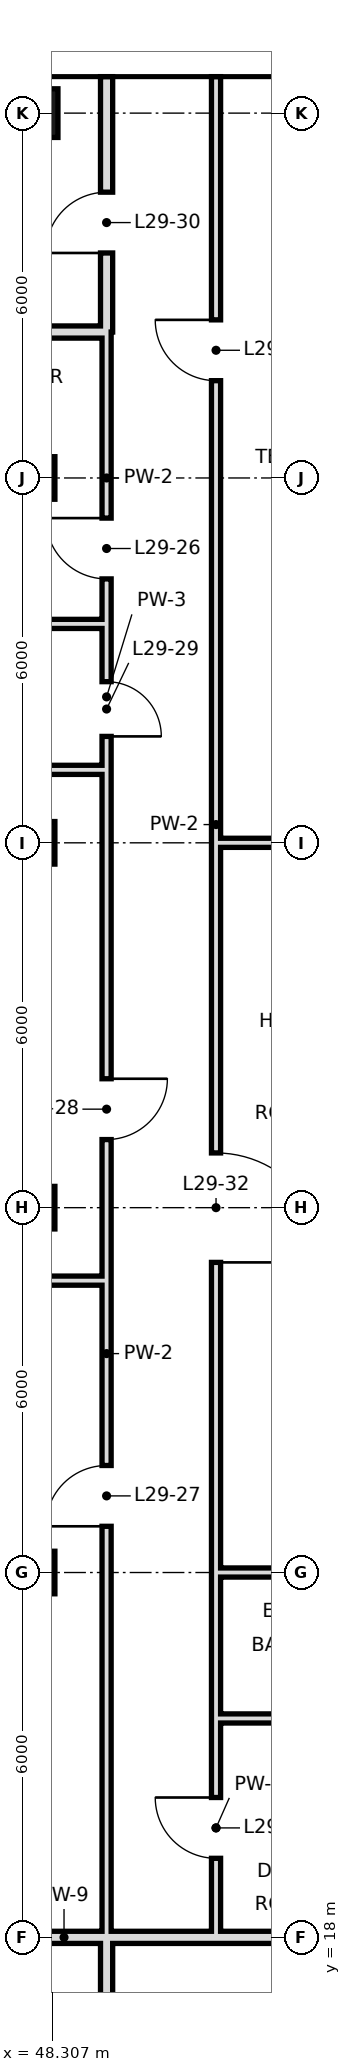
"""IFC4 building model, lengths in metres.
Left out: names, types, materials, properties, quantities, classifications, styles, units other than length and angle.
Written with IfcOpenShell. Run it as: python <this file> out.ifc"""

import sys

from ifc_helpers import new_model, si_unit, direction, frame, frame_2d, origin, origin_2d, place, context, subcontext, project, spatial, rectangle, hollow_rectangle, extrude, element, fill, save


model = new_model("IFC4")
c1 = context("Model", 3, precision=1e-05, world=origin(), true_north=direction((0.0, 1.0)))
c2 = subcontext(c1, "Body", "Model", "MODEL_VIEW")
j1 = project(units=[si_unit("LENGTHUNIT", "METRE"), si_unit("PLANEANGLEUNIT", "RADIAN")], contexts=[c1])
p1 = place(None, origin())
s1 = spatial("IfcSite", under=j1, at=p1, CompositionType="ELEMENT")
p2 = place(p1, origin())
s2 = spatial("IfcBuilding", under=s1, at=p2, CompositionType="ELEMENT")
p3 = place(p2, frame((0.0, 0.0, 130.4)))
s3 = spatial("IfcBuildingStorey", under=s2, at=p3, CompositionType="ELEMENT", Elevation=130.4)
for number, where, z_axis, x_axis in (
    (1, (48.0, 24.0, 0.0), (0.0, 0.0, 1.0), (1.0, 0.0, 0.0)),
    (2, (48.0, 30.0, 0.0), (0.0, 0.0, 1.0), (1.0, 0.0, 0.0)),
    (3, (48.0, 36.0, 0.0), (0.0, 0.0, 1.0), (1.0, 0.0, 0.0)),
    (4, (48.0, 42.0, 0.0), (0.0, 0.0, 1.0), (1.0, 0.0, 0.0)),
):
    element("IfcColumn", number, at=place(p3, frame(where, z_axis=z_axis, x_axis=x_axis)), inside=s3, PredefinedType="COLUMN", context=c2, shape_type="SweptSolid", body=[
        extrude(hollow_rectangle(XDim=0.7, YDim=0.7, WallThickness=0.036, at=origin_2d()), origin(), (0.0, 0.0, 1.0), 3.6),
    ])
p4 = place(p3, frame((48.0, 48.0, 0.0), z_axis=(0.0, 0.0, 1.0), x_axis=(1.0, 0.0, 0.0)))
e5 = element("IfcColumn", 5, at=p4, inside=s3, PredefinedType="COLUMN", context=c2, shape_type="SweptSolid", body=[
    extrude(hollow_rectangle(XDim=0.8, YDim=0.8, WallThickness=0.04, at=origin_2d()), origin(), (0.0, 0.0, 1.0), 3.6),
])
p5 = place(p3, frame((49.2, 10.8, 0.0), z_axis=(0.0, 0.0, 1.0), x_axis=(0.0, 1.0, 0.0)))
e6 = element("IfcWall", 6, at=p5, inside=s3, PredefinedType="SOLIDWALL", context=c2, shape_type="SweptSolid", body=[
    extrude(rectangle(XDim=7.2, YDim=0.2, at=frame_2d((3.6, 0.0))), origin(), (0.0, 0.0, 1.0), 2.72),
])
p6 = place(p3, frame((49.2, 44.4, 0.0), z_axis=(0.0, 0.0, 1.0), x_axis=(0.0, 1.0, 0.0)))
e7 = element("IfcWall", 7, at=p6, inside=s3, PredefinedType="SOLIDWALL", context=c2, shape_type="SweptSolid", body=[
    extrude(rectangle(XDim=4.2, YDim=0.2, at=frame_2d((2.1, 0.0))), origin(), (0.0, 0.0, 1.0), 2.97),
])
p7 = place(p6, frame((1.3, 0.0, 0.0)))
e8 = element("IfcOpeningElement", 8, at=p7, cuts=e7, PredefinedType="OPENING", context=c2, shape_type="SweptSolid", body=[
    extrude(rectangle(XDim=1.0, YDim=2.4, at=frame_2d((0.5, 1.2))), frame((0.0, 0.11, 0.0), z_axis=(0.0, -1.0, 0.0), x_axis=(1.0, 0.0, 0.0)), (0.0, 0.0, 1.0), 0.22),
])
p8 = place(p3, frame((49.2, 18.0, 0.0), z_axis=(0.0, 0.0, 1.0), x_axis=(0.0, 1.0, 0.0)))
e9 = element("IfcWall", 9, at=p8, inside=s3, PredefinedType="PARTITIONING", context=c2, shape_type="SweptSolid", body=[
    extrude(rectangle(XDim=19.2, YDim=0.15, at=frame_2d((9.6, 0.0))), origin(), (0.0, 0.0, 1.0), 3.42),
])
p9 = place(p8, frame((6.76, 0.0, 0.0)))
e10 = element("IfcOpeningElement", 10, at=p9, cuts=e9, PredefinedType="OPENING", context=c2, shape_type="SweptSolid", body=[
    extrude(rectangle(XDim=1.0, YDim=2.4, at=frame_2d((0.5, 1.2))), frame((0.0, 0.085, 0.0), z_axis=(0.0, -1.0, 0.0), x_axis=(1.0, 0.0, 0.0)), (0.0, 0.0, 1.0), 0.17),
])
p10 = place(p8, frame((13.12, 0.0, 0.0)))
e11 = element("IfcOpeningElement", 11, at=p10, cuts=e9, PredefinedType="OPENING", context=c2, shape_type="SweptSolid", body=[
    extrude(rectangle(XDim=1.0, YDim=2.4, at=frame_2d((0.5, 1.2))), frame((0.0, 0.085, 0.0), z_axis=(0.0, -1.0, 0.0), x_axis=(1.0, 0.0, 0.0)), (0.0, 0.0, 1.0), 0.17),
])
p11 = place(p3, frame((49.2, 39.6, 0.0), z_axis=(0.0, 0.0, 1.0), x_axis=(0.0, 1.0, 0.0)))
e12 = element("IfcWall", 12, at=p11, inside=s3, PredefinedType="PARTITIONING", context=c2, shape_type="SweptSolid", body=[
    extrude(rectangle(XDim=4.8, YDim=0.15, at=frame_2d((2.4, 0.0))), origin(), (0.0, 0.0, 1.0), 3.42),
])
p12 = place(p11, frame((0.74, 0.0, 0.0)))
e13 = element("IfcOpeningElement", 13, at=p12, cuts=e12, PredefinedType="OPENING", context=c2, shape_type="SweptSolid", body=[
    extrude(rectangle(XDim=1.0, YDim=2.4, at=frame_2d((0.5, 1.2))), frame((0.0, 0.085, 0.0), z_axis=(0.0, -1.0, 0.0), x_axis=(1.0, 0.0, 0.0)), (0.0, 0.0, 1.0), 0.17),
])
p13 = place(p3, frame((49.2, 37.2, 0.0), z_axis=(0.0, 0.0, 1.0), x_axis=(0.0, 1.0, 0.0)))
e14 = element("IfcWall", 14, at=p13, inside=s3, PredefinedType="PARTITIONING", context=c2, shape_type="SweptSolid", body=[
    extrude(rectangle(XDim=2.4, YDim=0.15, at=frame_2d((1.2, 0.0))), origin(), (0.0, 0.0, 1.0), 3.42),
])
p14 = place(p13, frame((0.55, 0.0, 0.0)))
e15 = element("IfcOpeningElement", 15, at=p14, cuts=e14, PredefinedType="OPENING", context=c2, shape_type="SweptSolid", body=[
    extrude(rectangle(XDim=0.9, YDim=2.4, at=frame_2d((0.45, 1.2))), frame((0.0, 0.085, 0.0), z_axis=(0.0, -1.0, 0.0), x_axis=(1.0, 0.0, 0.0)), (0.0, 0.0, 1.0), 0.17),
])
p15 = place(p3, frame((51.0, 18.0, 0.0), z_axis=(0.0, 0.0, 1.0), x_axis=(0.0, 1.0, 0.0)))
e16 = element("IfcWall", 16, at=p15, inside=s3, PredefinedType="PARTITIONING", context=c2, shape_type="SweptSolid", body=[
    extrude(rectangle(XDim=3.6, YDim=0.15, at=frame_2d((1.8, 0.0))), origin(), (0.0, 0.0, 1.0), 3.42),
])
p16 = place(p15, frame((1.3, 0.0, 0.0)))
e17 = element("IfcOpeningElement", 17, at=p16, cuts=e16, PredefinedType="OPENING", context=c2, shape_type="SweptSolid", body=[
    extrude(rectangle(XDim=1.0, YDim=2.4, at=frame_2d((0.5, 1.2))), frame((0.0, 0.085, 0.0), z_axis=(0.0, -1.0, 0.0), x_axis=(1.0, 0.0, 0.0)), (0.0, 0.0, 1.0), 0.17),
])
p17 = place(p3, frame((51.0, 24.0, 0.0), z_axis=(0.0, 0.0, 1.0), x_axis=(0.0, 1.0, 0.0)))
e18 = element("IfcWall", 18, at=p17, inside=s3, PredefinedType="PARTITIONING", context=c2, shape_type="SweptSolid", body=[
    extrude(rectangle(XDim=24.6, YDim=0.15, at=frame_2d((12.3, 0.0))), origin(), (0.0, 0.0, 1.0), 3.42),
])
p18 = place(p17, frame((5.1, 0.0, 0.0)))
e19 = element("IfcOpeningElement", 19, at=p18, cuts=e18, PredefinedType="OPENING", context=c2, shape_type="SweptSolid", body=[
    extrude(rectangle(XDim=1.8, YDim=2.4, at=frame_2d((0.9, 1.2))), frame((0.0, 0.085, 0.0), z_axis=(0.0, -1.0, 0.0), x_axis=(1.0, 0.0, 0.0)), (0.0, 0.0, 1.0), 0.17),
])
p19 = place(p17, frame((19.6, 0.0, 0.0)))
e20 = element("IfcOpeningElement", 20, at=p19, cuts=e18, PredefinedType="OPENING", context=c2, shape_type="SweptSolid", body=[
    extrude(rectangle(XDim=1.0, YDim=2.4, at=frame_2d((0.5, 1.2))), frame((0.0, 0.085, 0.0), z_axis=(0.0, -1.0, 0.0), x_axis=(1.0, 0.0, 0.0)), (0.0, 0.0, 1.0), 0.17),
])
p20 = place(p3, frame((51.0, 21.6, 0.0), z_axis=(0.0, 0.0, 1.0), x_axis=(0.0, 1.0, 0.0)))
e21 = element("IfcWall", 21, at=p20, inside=s3, PredefinedType="PARTITIONING", context=c2, shape_type="SweptSolid", body=[
    extrude(rectangle(XDim=2.4, YDim=0.15, at=frame_2d((1.2, 0.0))), origin(), (0.0, 0.0, 1.0), 3.42),
])
p21 = place(p3, frame((44.9, 18.0, 0.0), z_axis=(0.0, 0.0, 1.0), x_axis=(1.0, 0.0, 0.0)))
e22 = element("IfcWall", 22, at=p21, inside=s3, PredefinedType="SOLIDWALL", context=c2, shape_type="SweptSolid", body=[
    extrude(rectangle(XDim=4.3, YDim=0.2, at=frame_2d((2.15, 0.0))), origin(), (0.0, 0.0, 1.0), 2.72),
])
p22 = place(p3, frame((49.2, 18.0, 0.0), z_axis=(0.0, 0.0, 1.0), x_axis=(1.0, 0.0, 0.0)))
e23 = element("IfcWall", 23, at=p22, inside=s3, PredefinedType="SOLIDWALL", context=c2, shape_type="SweptSolid", body=[
    extrude(rectangle(XDim=11.4, YDim=0.2, at=frame_2d((5.7, 0.0))), origin(), (0.0, 0.0, 1.0), 2.72),
])
p23 = place(p3, frame((51.0, 21.6, 0.0), z_axis=(0.0, 0.0, 1.0), x_axis=(1.0, 0.0, 0.0)))
e24 = element("IfcWall", 24, at=p23, inside=s3, PredefinedType="PARTITIONING", context=c2, shape_type="SweptSolid", body=[
    extrude(rectangle(XDim=3.0, YDim=0.15, at=frame_2d((1.5, 0.0))), origin(), (0.0, 0.0, 1.0), 3.42),
])
p24 = place(p3, frame((51.0, 24.0, 0.0), z_axis=(0.0, 0.0, 1.0), x_axis=(1.0, 0.0, 0.0)))
e25 = element("IfcWall", 25, at=p24, inside=s3, PredefinedType="PARTITIONING", context=c2, shape_type="SweptSolid", body=[
    extrude(rectangle(XDim=3.0, YDim=0.15, at=frame_2d((1.5, 0.0))), origin(), (0.0, 0.0, 1.0), 2.72),
])
p25 = place(p3, frame((44.9, 28.8, 0.0), z_axis=(0.0, 0.0, 1.0), x_axis=(1.0, 0.0, 0.0)))
e26 = element("IfcWall", 26, at=p25, inside=s3, PredefinedType="PARTITIONING", context=c2, shape_type="SweptSolid", body=[
    extrude(rectangle(XDim=4.3, YDim=0.15, at=frame_2d((2.15, 0.0))), origin(), (0.0, 0.0, 1.0), 3.42),
])
p26 = place(p3, frame((51.0, 36.0, 0.0), z_axis=(0.0, 0.0, 1.0), x_axis=(1.0, 0.0, 0.0)))
e27 = element("IfcWall", 27, at=p26, inside=s3, PredefinedType="PARTITIONING", context=c2, shape_type="SweptSolid", body=[
    extrude(rectangle(XDim=9.0, YDim=0.15, at=frame_2d((4.5, 0.0))), origin(), (0.0, 0.0, 1.0), 2.72),
])
for number, where, z_axis, x_axis in (
    (28, (44.9, 37.2, 0.0), (0.0, 0.0, 1.0), (1.0, 0.0, 0.0)),
    (29, (44.9, 39.6, 0.0), (0.0, 0.0, 1.0), (1.0, 0.0, 0.0)),
):
    element("IfcWall", number, at=place(p3, frame(where, z_axis=z_axis, x_axis=x_axis)), inside=s3, PredefinedType="PARTITIONING", context=c2, shape_type="SweptSolid", body=[
        extrude(rectangle(XDim=4.3, YDim=0.15, at=frame_2d((2.15, 0.0))), origin(), (0.0, 0.0, 1.0), 3.42),
    ])
p27 = place(p3, frame((44.9, 44.4, 0.0), z_axis=(0.0, 0.0, 1.0), x_axis=(1.0, 0.0, 0.0)))
e30 = element("IfcWall", 30, at=p27, inside=s3, PredefinedType="SOLIDWALL", context=c2, shape_type="SweptSolid", body=[
    extrude(rectangle(XDim=4.3, YDim=0.2, at=frame_2d((2.15, 0.0))), origin(), (0.0, 0.0, 1.0), 2.97),
])
p28 = place(p12, frame((1.0, 0.0, 0.0), z_axis=(0.0, 0.0, 1.0), x_axis=(-1.0, 0.0, 0.0)))
e31 = element("IfcDoor", 31, at=p28, inside=s3, OperationType="SINGLE_SWING_LEFT", PredefinedType="DOOR", context=c2, shape_type="SweptSolid", body=[
    extrude(rectangle(XDim=1.0, YDim=2.4, at=frame_2d((0.5, 1.2))), frame((0.0, 0.025, 0.0), z_axis=(0.0, -1.0, 0.0), x_axis=(1.0, 0.0, 0.0)), (0.0, 0.0, 1.0), 0.05),
])
fill(e13, e31)
p29 = place(p9, origin())
e32 = element("IfcDoor", 32, at=p29, inside=s3, OperationType="SINGLE_SWING_LEFT", PredefinedType="DOOR", context=c2, shape_type="SweptSolid", body=[
    extrude(rectangle(XDim=1.0, YDim=2.4, at=frame_2d((0.5, 1.2))), frame((0.0, 0.025, 0.0), z_axis=(0.0, -1.0, 0.0), x_axis=(1.0, 0.0, 0.0)), (0.0, 0.0, 1.0), 0.05),
])
fill(e10, e32)
p30 = place(p10, origin())
e33 = element("IfcDoor", 33, at=p30, inside=s3, OperationType="SINGLE_SWING_RIGHT", PredefinedType="DOOR", context=c2, shape_type="SweptSolid", body=[
    extrude(rectangle(XDim=1.0, YDim=2.4, at=frame_2d((0.5, 1.2))), frame((0.0, 0.025, 0.0), z_axis=(0.0, -1.0, 0.0), x_axis=(1.0, 0.0, 0.0)), (0.0, 0.0, 1.0), 0.05),
])
fill(e11, e33)
p31 = place(p14, frame((0.9, 0.0, 0.0), z_axis=(0.0, 0.0, 1.0), x_axis=(-1.0, 0.0, 0.0)))
e34 = element("IfcDoor", 34, at=p31, inside=s3, OperationType="SINGLE_SWING_RIGHT", PredefinedType="DOOR", context=c2, shape_type="SweptSolid", body=[
    extrude(rectangle(XDim=0.9, YDim=2.4, at=frame_2d((0.45, 1.2))), frame((0.0, 0.025, 0.0), z_axis=(0.0, -1.0, 0.0), x_axis=(1.0, 0.0, 0.0)), (0.0, 0.0, 1.0), 0.05),
])
fill(e15, e34)
p32 = place(p7, origin())
e35 = element("IfcDoor", 35, at=p32, inside=s3, OperationType="SINGLE_SWING_LEFT", PredefinedType="DOOR", context=c2, shape_type="SweptSolid", body=[
    extrude(rectangle(XDim=1.0, YDim=2.4, at=frame_2d((0.5, 1.2))), frame((0.0, 0.025, 0.0), z_axis=(0.0, -1.0, 0.0), x_axis=(1.0, 0.0, 0.0)), (0.0, 0.0, 1.0), 0.05),
])
fill(e8, e35)
p33 = place(p16, frame((1.0, 0.0, 0.0), z_axis=(0.0, 0.0, 1.0), x_axis=(-1.0, 0.0, 0.0)))
e36 = element("IfcDoor", 36, at=p33, inside=s3, OperationType="SINGLE_SWING_LEFT", PredefinedType="DOOR", context=c2, shape_type="SweptSolid", body=[
    extrude(rectangle(XDim=1.0, YDim=2.4, at=frame_2d((0.5, 1.2))), frame((0.0, 0.025, 0.0), z_axis=(0.0, -1.0, 0.0), x_axis=(1.0, 0.0, 0.0)), (0.0, 0.0, 1.0), 0.05),
])
fill(e17, e36)
p34 = place(p18, frame((1.8, 0.0, 0.0), z_axis=(0.0, 0.0, 1.0), x_axis=(-1.0, 0.0, 0.0)))
e37 = element("IfcDoor", 37, at=p34, inside=s3, OperationType="SINGLE_SWING_RIGHT", PredefinedType="DOOR", context=c2, shape_type="SweptSolid", body=[
    extrude(rectangle(XDim=1.8, YDim=2.4, at=frame_2d((0.9, 1.2))), frame((0.0, 0.025, 0.0), z_axis=(0.0, -1.0, 0.0), x_axis=(1.0, 0.0, 0.0)), (0.0, 0.0, 1.0), 0.05),
])
fill(e19, e37)
p35 = place(p19, frame((1.0, 0.0, 0.0), z_axis=(0.0, 0.0, 1.0), x_axis=(-1.0, 0.0, 0.0)))
e38 = element("IfcDoor", 38, at=p35, inside=s3, OperationType="SINGLE_SWING_LEFT", PredefinedType="DOOR", context=c2, shape_type="SweptSolid", body=[
    extrude(rectangle(XDim=1.0, YDim=2.4, at=frame_2d((0.5, 1.2))), frame((0.0, 0.025, 0.0), z_axis=(0.0, -1.0, 0.0), x_axis=(1.0, 0.0, 0.0)), (0.0, 0.0, 1.0), 0.05),
])
fill(e20, e38)
save(model, sys.argv[1])
